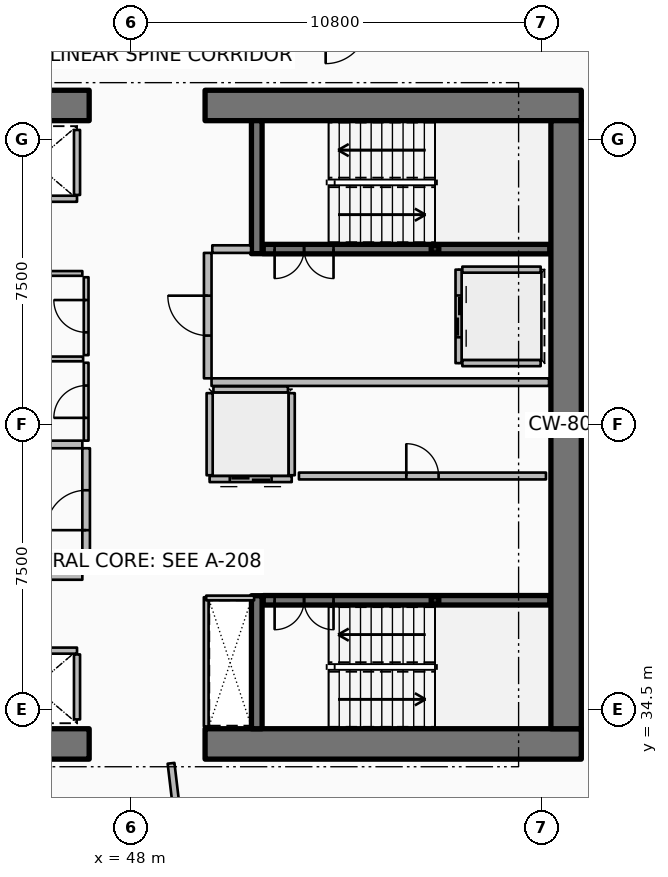
"""IFC4 building model, lengths in metres.
Left out: names, types, materials, properties, quantities, classifications, styles, units other than length and angle.
Written with IfcOpenShell. Run it as: python <this file> out.ifc"""

import sys

from ifc_helpers import new_model, si_unit, direction, frame, frame_2d, origin, origin_2d, place, context, subcontext, project, spatial, rectangle, hollow_rectangle, extrude, element, fill, save


model = new_model("IFC4")
c1 = context("Model", 3, precision=1e-05, world=origin(), true_north=direction((0.0, 1.0)))
c2 = subcontext(c1, "Body", "Model", "MODEL_VIEW")
j1 = project(units=[si_unit("LENGTHUNIT", "METRE"), si_unit("PLANEANGLEUNIT", "RADIAN")], contexts=[c1])
p1 = place(None, origin())
s1 = spatial("IfcSite", under=j1, at=p1, CompositionType="ELEMENT")
p2 = place(p1, origin())
s2 = spatial("IfcBuilding", under=s1, at=p2, CompositionType="ELEMENT")
p3 = place(p2, frame((0.0, 0.0, 154.05)))
s3 = spatial("IfcBuildingStorey", under=s2, at=p3, CompositionType="ELEMENT", Elevation=154.05)
p4 = place(p3, frame((37.0, 33.6, 0.0), z_axis=(0.0, 0.0, 1.0), x_axis=(1.0, 0.0, 0.0)))
e1 = element("IfcWall", 1, at=p4, inside=s3, PredefinedType="SHEAR", context=c2, shape_type="SweptSolid", body=[
    extrude(rectangle(XDim=9.9, YDim=0.8, at=frame_2d((4.95, 0.0))), origin(), (0.0, 0.0, 1.0), 3.75),
])
p5 = place(p3, frame((49.95, 33.6, 0.0), z_axis=(0.0, 0.0, 1.0), x_axis=(1.0, 0.0, 0.0)))
e2 = element("IfcWall", 2, at=p5, inside=s3, PredefinedType="SHEAR", context=c2, shape_type="SweptSolid", body=[
    extrude(rectangle(XDim=9.9, YDim=0.8, at=frame_2d((4.95, 0.0))), origin(), (0.0, 0.0, 1.0), 3.75),
])
p6 = place(p3, frame((37.0, 50.4, 0.0), z_axis=(0.0, 0.0, 1.0), x_axis=(1.0, 0.0, 0.0)))
e3 = element("IfcWall", 3, at=p6, inside=s3, PredefinedType="SHEAR", context=c2, shape_type="SweptSolid", body=[
    extrude(rectangle(XDim=9.9, YDim=0.8, at=frame_2d((4.95, 0.0))), origin(), (0.0, 0.0, 1.0), 3.75),
])
p7 = place(p3, frame((49.95, 50.4, 0.0), z_axis=(0.0, 0.0, 1.0), x_axis=(1.0, 0.0, 0.0)))
e4 = element("IfcWall", 4, at=p7, inside=s3, PredefinedType="SHEAR", context=c2, shape_type="SweptSolid", body=[
    extrude(rectangle(XDim=9.9, YDim=0.8, at=frame_2d((4.95, 0.0))), origin(), (0.0, 0.0, 1.0), 3.75),
])
p8 = place(p3, frame((59.45, 34.0, 0.0), z_axis=(0.0, 0.0, 1.0), x_axis=(0.0, 1.0, 0.0)))
e5 = element("IfcWall", 5, at=p8, inside=s3, PredefinedType="SHEAR", context=c2, shape_type="SweptSolid", body=[
    extrude(rectangle(XDim=16.0, YDim=0.8, at=frame_2d((8.0, 0.0))), origin(), (0.0, 0.0, 1.0), 3.75),
])
for number, where, z_axis, x_axis in (
    (6, (51.31, 46.5, 0.0), (0.0, 0.0, 1.0), (0.0, 1.0, 0.0)),
    (7, (51.31, 34.0, 0.0), (0.0, 0.0, 1.0), (0.0, 1.0, 0.0)),
):
    element("IfcWall", number, at=place(p3, frame(where, z_axis=z_axis, x_axis=x_axis)), inside=s3, PredefinedType="SHEAR", context=c2, shape_type="SweptSolid", body=[
        extrude(rectangle(XDim=3.5, YDim=0.28, at=frame_2d((1.75, 0.0))), origin(), (0.0, 0.0, 1.0), 3.75),
    ])
for number, where, z_axis, x_axis in (
    (8, (56.0, 46.62, 0.0), (0.0, 0.0, 1.0), (1.0, 0.0, 0.0)),
    (9, (56.0, 37.38, 0.0), (0.0, 0.0, 1.0), (1.0, 0.0, 0.0)),
):
    element("IfcColumn", number, at=place(p3, frame(where, z_axis=z_axis, x_axis=x_axis)), inside=s3, PredefinedType="COLUMN", context=c2, shape_type="SweptSolid", body=[
        extrude(hollow_rectangle(XDim=0.2, YDim=0.2, WallThickness=0.01, InnerFilletRadius=0.01, OuterFilletRadius=0.02, at=origin_2d()), origin(), (0.0, 0.0, 1.0), 1.67),
    ])
p9 = place(p3, frame((51.48, 46.62, 0.0), z_axis=(0.0, 0.0, 1.0), x_axis=(1.0, 0.0, 0.0)))
e10 = element("IfcWall", 10, at=p9, inside=s3, PredefinedType="SOLIDWALL", context=c2, shape_type="SweptSolid", body=[
    extrude(rectangle(XDim=7.54, YDim=0.25, at=frame_2d((3.77, 0.0))), origin(), (0.0, 0.0, 1.0), 3.5),
])
p10 = place(p9, frame((0.3, 0.0, 0.0)))
e11 = element("IfcOpeningElement", 11, at=p10, cuts=e10, PredefinedType="OPENING", context=c2, shape_type="SweptSolid", body=[
    extrude(rectangle(XDim=1.55, YDim=2.15, at=frame_2d((0.775, 1.075))), frame((0.0, 0.135, 0.0), z_axis=(0.0, -1.0, 0.0), x_axis=(1.0, 0.0, 0.0)), (0.0, 0.0, 1.0), 0.27),
])
p11 = place(p3, frame((51.48, 37.38, 0.0), z_axis=(0.0, 0.0, 1.0), x_axis=(1.0, 0.0, 0.0)))
e12 = element("IfcWall", 12, at=p11, inside=s3, PredefinedType="SOLIDWALL", context=c2, shape_type="SweptSolid", body=[
    extrude(rectangle(XDim=7.54, YDim=0.25, at=frame_2d((3.77, 0.0))), origin(), (0.0, 0.0, 1.0), 3.5),
])
p12 = place(p11, frame((0.3, 0.0, 0.0)))
e13 = element("IfcOpeningElement", 13, at=p12, cuts=e12, PredefinedType="OPENING", context=c2, shape_type="SweptSolid", body=[
    extrude(rectangle(XDim=1.55, YDim=2.15, at=frame_2d((0.775, 1.075))), frame((0.0, 0.135, 0.0), z_axis=(0.0, -1.0, 0.0), x_axis=(1.0, 0.0, 0.0)), (0.0, 0.0, 1.0), 0.27),
])
p13 = place(p3, frame((46.58, 47.945, 0.0), z_axis=(0.0, 0.0, 1.0), x_axis=(-1.0, 0.0, 0.0)))
e14 = element("IfcWall", 14, at=p13, inside=s3, PredefinedType="PARTITIONING", context=c2, shape_type="SweptSolid", body=[
    extrude(rectangle(XDim=2.26, YDim=0.16, at=frame_2d((1.13, 0.0))), origin(), (0.0, 0.0, 1.0), 3.5),
])
p14 = place(p3, frame((46.58, 48.045, 0.0), z_axis=(0.0, 0.0, 1.0), x_axis=(0.0, 1.0, 0.0)))
e15 = element("IfcWall", 15, at=p14, inside=s3, PredefinedType="PARTITIONING", context=c2, shape_type="SweptSolid", body=[
    extrude(rectangle(XDim=1.71, YDim=0.16, at=frame_2d((0.855, 0.0))), origin(), (0.0, 0.0, 1.0), 3.5),
])
p15 = place(p3, frame((44.32, 36.055, 0.0), z_axis=(0.0, 0.0, 1.0), x_axis=(1.0, 0.0, 0.0)))
e16 = element("IfcWall", 16, at=p15, inside=s3, PredefinedType="PARTITIONING", context=c2, shape_type="SweptSolid", body=[
    extrude(rectangle(XDim=2.26, YDim=0.16, at=frame_2d((1.13, 0.0))), origin(), (0.0, 0.0, 1.0), 3.5),
])
p16 = place(p3, frame((46.58, 34.245, 0.0), z_axis=(0.0, 0.0, 1.0), x_axis=(0.0, 1.0, 0.0)))
e17 = element("IfcWall", 17, at=p16, inside=s3, PredefinedType="PARTITIONING", context=c2, shape_type="SweptSolid", body=[
    extrude(rectangle(XDim=1.71, YDim=0.16, at=frame_2d((0.855, 0.0))), origin(), (0.0, 0.0, 1.0), 3.5),
])
p17 = place(p3, frame((56.62, 46.08, 0.0), z_axis=(0.0, 0.0, 1.0), x_axis=(0.0, -1.0, 0.0)))
e18 = element("IfcWall", 18, at=p17, inside=s3, PredefinedType="PARTITIONING", context=c2, shape_type="SweptSolid", body=[
    extrude(rectangle(XDim=2.46, YDim=0.16, at=frame_2d((1.23, 0.0))), origin(), (0.0, 0.0, 1.0), 3.5),
])
p18 = place(p17, frame((0.68, 0.0, 0.0)))
e19 = element("IfcOpeningElement", 19, at=p18, cuts=e18, PredefinedType="OPENING", context=c2, shape_type="SweptSolid", body=[
    extrude(rectangle(XDim=1.1, YDim=2.1, at=frame_2d((0.55, 1.05))), frame((0.0, 0.09, 0.0), z_axis=(0.0, -1.0, 0.0), x_axis=(1.0, 0.0, 0.0)), (0.0, 0.0, 1.0), 0.18),
])
for number, where, z_axis, x_axis in (
    (20, (56.72, 46.08, 0.0), (0.0, 0.0, 1.0), (1.0, 0.0, 0.0)),
    (21, (56.72, 43.62, 0.0), (0.0, 0.0, 1.0), (1.0, 0.0, 0.0)),
):
    element("IfcWall", number, at=place(p3, frame(where, z_axis=z_axis, x_axis=x_axis)), inside=s3, PredefinedType="PARTITIONING", context=c2, shape_type="SweptSolid", body=[
        extrude(rectangle(XDim=2.06, YDim=0.16, at=frame_2d((1.03, 0.0))), origin(), (0.0, 0.0, 1.0), 3.5),
    ])
p19 = place(p3, frame((52.23, 40.57, 0.0), z_axis=(0.0, 0.0, 1.0), x_axis=(-1.0, 0.0, 0.0)))
e22 = element("IfcWall", 22, at=p19, inside=s3, PredefinedType="PARTITIONING", context=c2, shape_type="SweptSolid", body=[
    extrude(rectangle(XDim=2.16, YDim=0.16, at=frame_2d((1.08, 0.0))), origin(), (0.0, 0.0, 1.0), 3.5),
])
p20 = place(p19, frame((0.53, 0.0, 0.0)))
e23 = element("IfcOpeningElement", 23, at=p20, cuts=e22, PredefinedType="OPENING", context=c2, shape_type="SweptSolid", body=[
    extrude(rectangle(XDim=1.1, YDim=2.1, at=frame_2d((0.55, 1.05))), frame((0.0, 0.09, 0.0), z_axis=(0.0, -1.0, 0.0), x_axis=(1.0, 0.0, 0.0)), (0.0, 0.0, 1.0), 0.18),
])
for number, where, z_axis, x_axis in (
    (24, (52.23, 40.67, 0.0), (0.0, 0.0, 1.0), (0.0, 1.0, 0.0)),
    (25, (50.07, 40.67, 0.0), (0.0, 0.0, 1.0), (0.0, 1.0, 0.0)),
):
    element("IfcWall", number, at=place(p3, frame(where, z_axis=z_axis, x_axis=x_axis)), inside=s3, PredefinedType="PARTITIONING", context=c2, shape_type="SweptSolid", body=[
        extrude(rectangle(XDim=2.16, YDim=0.16, at=frame_2d((1.08, 0.0))), origin(), (0.0, 0.0, 1.0), 3.5),
    ])
p21 = place(p3, frame((50.17, 42.93, 0.0), z_axis=(0.0, 0.0, 1.0), x_axis=(1.0, 0.0, 0.0)))
e26 = element("IfcWall", 26, at=p21, inside=s3, PredefinedType="PARTITIONING", context=c2, shape_type="SweptSolid", body=[
    extrude(rectangle(XDim=1.96, YDim=0.16, at=frame_2d((0.98, 0.0))), origin(), (0.0, 0.0, 1.0), 3.5),
])
p22 = place(p3, frame((52.42, 40.65, 0.0), z_axis=(0.0, 0.0, 1.0), x_axis=(1.0, 0.0, 0.0)))
e27 = element("IfcWall", 27, at=p22, inside=s3, PredefinedType="PARTITIONING", context=c2, shape_type="SweptSolid", body=[
    extrude(rectangle(XDim=6.5, YDim=0.18, at=frame_2d((3.25, 0.0))), origin(), (0.0, 0.0, 1.0), 3.5),
])
p23 = place(p22, frame((2.825, 0.0, 0.0)))
e28 = element("IfcOpeningElement", 28, at=p23, cuts=e27, PredefinedType="OPENING", context=c2, shape_type="SweptSolid", body=[
    extrude(rectangle(XDim=0.85, YDim=2.06, at=frame_2d((0.425, 1.03))), frame((0.0, 0.1, 0.0), z_axis=(0.0, -1.0, 0.0), x_axis=(1.0, 0.0, 0.0)), (0.0, 0.0, 1.0), 0.2),
])
p24 = place(p3, frame((41.35, 38.02, 0.0), z_axis=(0.0, 0.0, 1.0), x_axis=(1.0, 0.0, 0.0)))
e29 = element("IfcWall", 29, at=p24, inside=s3, PredefinedType="PARTITIONING", context=c2, shape_type="SweptSolid", body=[
    extrude(rectangle(XDim=5.37, YDim=0.2, at=frame_2d((2.685, 0.0))), origin(), (0.0, 0.0, 1.0), 3.5),
])
p25 = place(p3, frame((43.92, 41.48, 0.0), z_axis=(0.0, 0.0, 1.0), x_axis=(1.0, 0.0, 0.0)))
e30 = element("IfcWall", 30, at=p25, inside=s3, PredefinedType="PARTITIONING", context=c2, shape_type="SweptSolid", body=[
    extrude(rectangle(XDim=2.8, YDim=0.2, at=frame_2d((1.4, 0.0))), origin(), (0.0, 0.0, 1.0), 3.5),
])
p26 = place(p3, frame((46.82, 38.12, 0.0), z_axis=(0.0, 0.0, 1.0), x_axis=(0.0, 1.0, 0.0)))
e31 = element("IfcWall", 31, at=p26, inside=s3, PredefinedType="PARTITIONING", context=c2, shape_type="SweptSolid", body=[
    extrude(rectangle(XDim=3.26, YDim=0.2, at=frame_2d((1.63, 0.0))), origin(), (0.0, 0.0, 1.0), 3.5),
])
p27 = place(p26, frame((1.105, 0.0, 0.0)))
e32 = element("IfcOpeningElement", 32, at=p27, cuts=e31, PredefinedType="OPENING", context=c2, shape_type="SweptSolid", body=[
    extrude(rectangle(XDim=1.05, YDim=2.1, at=frame_2d((0.525, 1.05))), frame((0.0, 0.11, 0.0), z_axis=(0.0, -1.0, 0.0), x_axis=(1.0, 0.0, 0.0)), (0.0, 0.0, 1.0), 0.22),
])
p28 = place(p3, frame((50.12, 43.12, 0.0), z_axis=(0.0, 0.0, 1.0), x_axis=(1.0, 0.0, 0.0)))
e33 = element("IfcWall", 33, at=p28, inside=s3, PredefinedType="PARTITIONING", context=c2, shape_type="SweptSolid", body=[
    extrude(rectangle(XDim=8.88, YDim=0.2, at=frame_2d((4.44, 0.0))), origin(), (0.0, 0.0, 1.0), 3.5),
])
p29 = place(p3, frame((50.14, 46.62, 0.0), z_axis=(0.0, 0.0, 1.0), x_axis=(1.0, 0.0, 0.0)))
e34 = element("IfcWall", 34, at=p29, inside=s3, PredefinedType="PARTITIONING", context=c2, shape_type="SweptSolid", body=[
    extrude(rectangle(XDim=1.02, YDim=0.2, at=frame_2d((0.51, 0.0))), origin(), (0.0, 0.0, 1.0), 3.5),
])
p30 = place(p3, frame((50.02, 43.22, 0.0), z_axis=(0.0, 0.0, 1.0), x_axis=(0.0, 1.0, 0.0)))
e35 = element("IfcWall", 35, at=p30, inside=s3, PredefinedType="PARTITIONING", context=c2, shape_type="SweptSolid", body=[
    extrude(rectangle(XDim=3.3, YDim=0.2, at=frame_2d((1.65, 0.0))), origin(), (0.0, 0.0, 1.0), 3.5),
])
p31 = place(p30, frame((1.125, 0.0, 0.0)))
e36 = element("IfcOpeningElement", 36, at=p31, cuts=e35, PredefinedType="OPENING", context=c2, shape_type="SweptSolid", body=[
    extrude(rectangle(XDim=1.05, YDim=2.1, at=frame_2d((0.525, 1.05))), frame((0.0, 0.11, 0.0), z_axis=(0.0, -1.0, 0.0), x_axis=(1.0, 0.0, 0.0)), (0.0, 0.0, 1.0), 0.22),
])
p32 = place(p3, frame((41.36, 45.98, 0.0), z_axis=(0.0, 0.0, 1.0), x_axis=(1.0, 0.0, 0.0)))
e37 = element("IfcWall", 37, at=p32, inside=s3, PredefinedType="PARTITIONING", context=c2, shape_type="SweptSolid", body=[
    extrude(rectangle(XDim=5.36, YDim=0.125, at=frame_2d((2.68, 0.0))), origin(), (0.0, 0.0, 1.0), 2.94),
])
p33 = place(p3, frame((49.98, 34.06, 0.0), z_axis=(0.0, 0.0, 1.0), x_axis=(0.0, 1.0, 0.0)))
e38 = element("IfcWall", 38, at=p33, inside=s3, PredefinedType="PARTITIONING", context=c2, shape_type="SweptSolid", body=[
    extrude(rectangle(XDim=3.4, YDim=0.125, at=frame_2d((1.7, 0.0))), origin(), (0.0, 0.0, 1.0), 2.94),
])
p34 = place(p3, frame((49.98, 37.44, 0.0), z_axis=(0.0, 0.0, 1.0), x_axis=(1.0, 0.0, 0.0)))
e39 = element("IfcWall", 39, at=p34, inside=s3, PredefinedType="PARTITIONING", context=c2, shape_type="SweptSolid", body=[
    extrude(rectangle(XDim=1.26, YDim=0.125, at=frame_2d((0.63, 0.0))), origin(), (0.0, 0.0, 1.0), 2.94),
])
p35 = place(p3, frame((44.03, 43.73, 0.0), z_axis=(0.0, 0.0, 1.0), x_axis=(1.0, 0.0, 0.0)))
e40 = element("IfcWall", 40, at=p35, inside=s3, PredefinedType="PARTITIONING", context=c2, shape_type="SweptSolid", body=[
    extrude(rectangle(XDim=2.71, YDim=0.125, at=frame_2d((1.355, 0.0))), origin(), (0.0, 0.0, 1.0), 2.94),
])
p36 = place(p3, frame((46.82, 41.58, 0.0), z_axis=(0.0, 0.0, 1.0), x_axis=(0.0, 1.0, 0.0)))
e41 = element("IfcWall", 41, at=p36, inside=s3, PredefinedType="PARTITIONING", context=c2, shape_type="SweptSolid", body=[
    extrude(rectangle(XDim=2.05, YDim=0.125, at=frame_2d((1.025, 0.0))), origin(), (0.0, 0.0, 1.0), 2.94),
])
p37 = place(p36, frame((0.6, 0.0, 0.0)))
e42 = element("IfcOpeningElement", 42, at=p37, cuts=e41, PredefinedType="OPENING", context=c2, shape_type="SweptSolid", body=[
    extrude(rectangle(XDim=0.85, YDim=2.06, at=frame_2d((0.425, 1.03))), frame((0.0, 0.073, 0.0), z_axis=(0.0, -1.0, 0.0), x_axis=(1.0, 0.0, 0.0)), (0.0, 0.0, 1.0), 0.145),
])
p38 = place(p3, frame((46.82, 43.83, 0.0), z_axis=(0.0, 0.0, 1.0), x_axis=(0.0, 1.0, 0.0)))
e43 = element("IfcWall", 43, at=p38, inside=s3, PredefinedType="PARTITIONING", context=c2, shape_type="SweptSolid", body=[
    extrude(rectangle(XDim=2.05, YDim=0.125, at=frame_2d((1.025, 0.0))), origin(), (0.0, 0.0, 1.0), 2.94),
])
p39 = place(p38, frame((0.6, 0.0, 0.0)))
e44 = element("IfcOpeningElement", 44, at=p39, cuts=e43, PredefinedType="OPENING", context=c2, shape_type="SweptSolid", body=[
    extrude(rectangle(XDim=0.85, YDim=2.06, at=frame_2d((0.425, 1.03))), frame((0.0, 0.073, 0.0), z_axis=(0.0, -1.0, 0.0), x_axis=(1.0, 0.0, 0.0)), (0.0, 0.0, 1.0), 0.145),
])
p40 = place(p3, frame((49.054, 33.091, 0.0), z_axis=(0.0, 0.0, 1.0), x_axis=(0.117543744731, -0.993067705685, 0.0)))
e45 = element("IfcWall", 45, at=p40, inside=s3, PredefinedType="PARTITIONING", context=c2, shape_type="SweptSolid", body=[
    extrude(rectangle(XDim=12.763, YDim=0.18, at=frame_2d((6.382, 0.0))), origin(), (0.0, 0.0, 1.0), 2.94),
])
p41 = place(p3, frame((63.52, 50.815, 0.0), z_axis=(0.0, 0.0, 1.0), x_axis=(-0.649447526186, 0.760406411553, 0.0)))
e46 = element("IfcWall", 46, at=p41, inside=s3, PredefinedType="PARTITIONING", context=c2, shape_type="SweptSolid", body=[
    extrude(rectangle(XDim=6.753, YDim=0.125, at=frame_2d((3.376, 0.0))), origin(), (0.0, 0.0, 1.0), 2.94),
])
p42 = place(p41, frame((2.926, 0.0, 0.0)))
e47 = element("IfcOpeningElement", 47, at=p42, cuts=e46, PredefinedType="OPENING", context=c2, shape_type="SweptSolid", body=[
    extrude(rectangle(XDim=0.9, YDim=2.08, at=frame_2d((0.45, 1.04))), frame((0.0, 0.073, 0.0), z_axis=(0.0, -1.0, 0.0), x_axis=(1.0, 0.0, 0.0)), (0.0, 0.0, 1.0), 0.145),
])
p43 = place(p10, origin())
e48 = element("IfcDoor", 48, at=p43, inside=s3, OperationType="DOUBLE_DOOR_SINGLE_SWING", PredefinedType="DOOR", context=c2, shape_type="SweptSolid", body=[
    extrude(rectangle(XDim=1.55, YDim=2.15, at=frame_2d((0.775, 1.075))), frame((0.0, 0.025, 0.0), z_axis=(0.0, -1.0, 0.0), x_axis=(1.0, 0.0, 0.0)), (0.0, 0.0, 1.0), 0.05),
])
fill(e11, e48)
p44 = place(p12, origin())
e49 = element("IfcDoor", 49, at=p44, inside=s3, OperationType="DOUBLE_DOOR_SINGLE_SWING", PredefinedType="DOOR", context=c2, shape_type="SweptSolid", body=[
    extrude(rectangle(XDim=1.55, YDim=2.15, at=frame_2d((0.775, 1.075))), frame((0.0, 0.025, 0.0), z_axis=(0.0, -1.0, 0.0), x_axis=(1.0, 0.0, 0.0)), (0.0, 0.0, 1.0), 0.05),
])
fill(e13, e49)
p45 = place(p18, origin())
e50 = element("IfcDoor", 50, at=p45, inside=s3, OperationType="DOUBLE_DOOR_SLIDING", PredefinedType="DOOR", context=c2, shape_type="SweptSolid", body=[
    extrude(rectangle(XDim=1.1, YDim=2.1, at=frame_2d((0.55, 1.05))), frame((0.0, 0.025, 0.0), z_axis=(0.0, -1.0, 0.0), x_axis=(1.0, 0.0, 0.0)), (0.0, 0.0, 1.0), 0.05),
])
fill(e19, e50)
p46 = place(p20, origin())
e51 = element("IfcDoor", 51, at=p46, inside=s3, OperationType="DOUBLE_DOOR_SLIDING", PredefinedType="DOOR", context=c2, shape_type="SweptSolid", body=[
    extrude(rectangle(XDim=1.1, YDim=2.1, at=frame_2d((0.55, 1.05))), frame((0.0, 0.025, 0.0), z_axis=(0.0, -1.0, 0.0), x_axis=(1.0, 0.0, 0.0)), (0.0, 0.0, 1.0), 0.05),
])
fill(e23, e51)
p47 = place(p23, origin())
e52 = element("IfcDoor", 52, at=p47, inside=s3, OperationType="SINGLE_SWING_LEFT", PredefinedType="DOOR", context=c2, shape_type="SweptSolid", body=[
    extrude(rectangle(XDim=0.85, YDim=2.06, at=frame_2d((0.425, 1.03))), frame((0.0, 0.025, 0.0), z_axis=(0.0, -1.0, 0.0), x_axis=(1.0, 0.0, 0.0)), (0.0, 0.0, 1.0), 0.05),
])
fill(e28, e52)
p48 = place(p27, origin())
e53 = element("IfcDoor", 53, at=p48, inside=s3, OperationType="SINGLE_SWING_LEFT", PredefinedType="DOOR", context=c2, shape_type="SweptSolid", body=[
    extrude(rectangle(XDim=1.05, YDim=2.1, at=frame_2d((0.525, 1.05))), frame((0.0, 0.025, 0.0), z_axis=(0.0, -1.0, 0.0), x_axis=(1.0, 0.0, 0.0)), (0.0, 0.0, 1.0), 0.05),
])
fill(e32, e53)
p49 = place(p31, origin())
e54 = element("IfcDoor", 54, at=p49, inside=s3, OperationType="SINGLE_SWING_RIGHT", PredefinedType="DOOR", context=c2, shape_type="SweptSolid", body=[
    extrude(rectangle(XDim=1.05, YDim=2.1, at=frame_2d((0.525, 1.05))), frame((0.0, 0.025, 0.0), z_axis=(0.0, -1.0, 0.0), x_axis=(1.0, 0.0, 0.0)), (0.0, 0.0, 1.0), 0.05),
])
fill(e36, e54)
p50 = place(p37, origin())
e55 = element("IfcDoor", 55, at=p50, inside=s3, OperationType="SINGLE_SWING_LEFT", PredefinedType="DOOR", context=c2, shape_type="SweptSolid", body=[
    extrude(rectangle(XDim=0.85, YDim=2.06, at=frame_2d((0.425, 1.03))), frame((0.0, 0.025, 0.0), z_axis=(0.0, -1.0, 0.0), x_axis=(1.0, 0.0, 0.0)), (0.0, 0.0, 1.0), 0.05),
])
fill(e42, e55)
p51 = place(p39, origin())
e56 = element("IfcDoor", 56, at=p51, inside=s3, OperationType="SINGLE_SWING_RIGHT", PredefinedType="DOOR", context=c2, shape_type="SweptSolid", body=[
    extrude(rectangle(XDim=0.85, YDim=2.06, at=frame_2d((0.425, 1.03))), frame((0.0, 0.025, 0.0), z_axis=(0.0, -1.0, 0.0), x_axis=(1.0, 0.0, 0.0)), (0.0, 0.0, 1.0), 0.05),
])
fill(e44, e56)
save(model, sys.argv[1])
